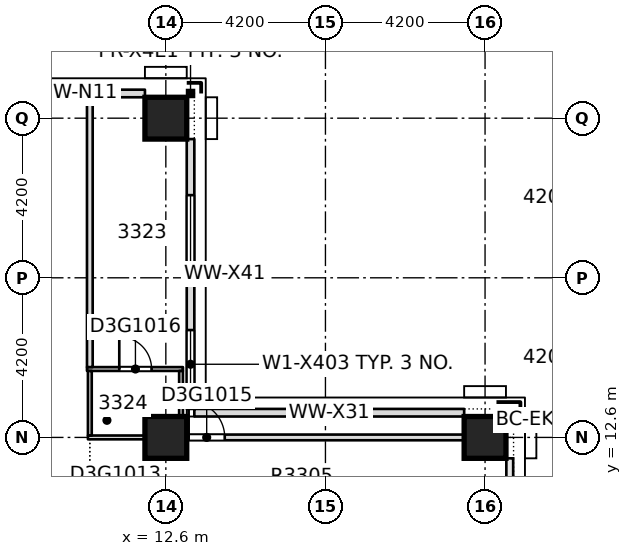
"""IFC4 building model, lengths in metres.
Left out: names, types, materials, properties, quantities, classifications, styles, units other than length and angle.
Written with IfcOpenShell. Run it as: python <this file> out.ifc"""

import sys

from ifc_helpers import new_model, si_unit, direction, frame, frame_2d, origin, origin_2d, place, context, subcontext, project, spatial, rectangle, extrude, element, fill, save


model = new_model("IFC4")
c1 = context("Model", 3, precision=1e-05, world=origin(), true_north=direction((0.0, 1.0)))
c2 = subcontext(c1, "Body", "Model", "MODEL_VIEW")
j1 = project(units=[si_unit("LENGTHUNIT", "METRE"), si_unit("PLANEANGLEUNIT", "RADIAN")], contexts=[c1])
p1 = place(None, origin())
s1 = spatial("IfcSite", under=j1, at=p1, CompositionType="ELEMENT")
p2 = place(p1, origin())
s2 = spatial("IfcBuilding", under=s1, at=p2, CompositionType="ELEMENT")
p3 = place(p2, frame((0.0, 0.0, 133.1)))
s3 = spatial("IfcBuildingStorey", under=s2, at=p3, CompositionType="ELEMENT", Elevation=133.1)
for number, where, z_axis, x_axis in (
    (1, (12.6, 12.6, -0.4), (0.0, 0.0, 1.0), (1.0, 0.0, 0.0)),
    (2, (21.0, 12.6, -0.4), (0.0, 0.0, 1.0), (1.0, 0.0, 0.0)),
    (3, (12.6, 21.0, -0.4), (0.0, 0.0, 1.0), (1.0, 0.0, 0.0)),
):
    element("IfcColumn", number, at=place(p3, frame(where, z_axis=z_axis, x_axis=x_axis)), inside=s3, PredefinedType="COLUMN", context=c2, shape_type="SweptSolid", body=[
        extrude(rectangle(XDim=1.1, YDim=1.1, at=origin_2d()), origin(), (0.0, 0.0, 1.0), 3.45),
    ])
p4 = place(p3, frame((10.55, 12.6, 0.0), z_axis=(0.0, 0.0, 1.0), x_axis=(1.0, 0.0, 0.0)))
e4 = element("IfcWall", 4, at=p4, inside=s3, PredefinedType="PARTITIONING", context=c2, shape_type="SweptSolid", body=[
    extrude(rectangle(XDim=2.5, YDim=0.1, at=frame_2d((1.25, 0.0))), origin(), (0.0, 0.0, 1.0), 3.05),
])
p5 = place(p3, frame((12.95, 12.6, 0.0), z_axis=(0.0, 0.0, 1.0), x_axis=(1.0, 0.0, 0.0)))
e5 = element("IfcWall", 5, at=p5, inside=s3, PredefinedType="PARTITIONING", context=c2, shape_type="SweptSolid", body=[
    extrude(rectangle(XDim=0.2, YDim=0.15, at=frame_2d((0.1, 0.0))), origin(), (0.0, 0.0, 1.0), 3.05),
])
p6 = place(p3, frame((10.525, 14.4, 0.0), z_axis=(0.0, 0.0, 1.0), x_axis=(1.0, 0.0, 0.0)))
e6 = element("IfcWall", 6, at=p6, inside=s3, PredefinedType="PARTITIONING", context=c2, shape_type="SweptSolid", body=[
    extrude(rectangle(XDim=2.525, YDim=0.1, at=frame_2d((1.263, 0.0))), origin(), (0.0, 0.0, 1.0), 3.05),
])
p7 = place(p6, frame((0.85, 0.0, 0.0)))
e7 = element("IfcOpeningElement", 7, at=p7, cuts=e6, PredefinedType="OPENING", context=c2, shape_type="SweptSolid", body=[
    extrude(rectangle(XDim=0.85, YDim=2.1, at=frame_2d((0.425, 1.05))), frame((0.0, 0.06, 0.0), z_axis=(0.0, -1.0, 0.0), x_axis=(1.0, 0.0, 0.0)), (0.0, 0.0, 1.0), 0.12),
])
p8 = place(p3, frame((10.6, 12.65, 0.0), z_axis=(0.0, 0.0, 1.0), x_axis=(0.0, 1.0, 0.0)))
e8 = element("IfcWall", 8, at=p8, inside=s3, PredefinedType="PARTITIONING", context=c2, shape_type="SweptSolid", body=[
    extrude(rectangle(XDim=1.7, YDim=0.1, at=frame_2d((0.85, 0.0))), origin(), (0.0, 0.0, 1.0), 3.05),
])
p9 = place(p3, frame((10.6, 14.45, 0.0), z_axis=(0.0, 0.0, 1.0), x_axis=(0.0, 1.0, 0.0)))
e9 = element("IfcWall", 9, at=p9, inside=s3, PredefinedType="PARTITIONING", context=c2, shape_type="SweptSolid", body=[
    extrude(rectangle(XDim=7.1, YDim=0.15, at=frame_2d((3.55, 0.0))), origin(), (0.0, 0.0, 1.0), 3.05),
])
p10 = place(p3, frame((13.0, 12.675, 0.0), z_axis=(0.0, 0.0, 1.0), x_axis=(0.0, 1.0, 0.0)))
e10 = element("IfcWall", 10, at=p10, inside=s3, PredefinedType="PARTITIONING", context=c2, shape_type="SweptSolid", body=[
    extrude(rectangle(XDim=1.675, YDim=0.1, at=frame_2d((0.837, 0.0))), origin(), (0.0, 0.0, 1.0), 3.05),
])
p11 = place(p3, frame((20.45, 13.25, 0.0), z_axis=(0.0, 0.0, 1.0), x_axis=(-1.0, 0.0, 0.0)))
e11 = element("IfcWall", 11, at=p11, inside=s3, PredefinedType="STANDARD", context=c2, shape_type="SweptSolid", body=[
    extrude(rectangle(XDim=7.1, YDim=0.2, at=frame_2d((3.55, 0.0))), origin(), (0.0, 0.0, 1.0), 3.05),
])
p12 = place(p3, frame((13.25, 13.35, 0.0), z_axis=(0.0, 0.0, 1.0), x_axis=(0.0, 1.0, 0.0)))
e12 = element("IfcWall", 12, at=p12, inside=s3, PredefinedType="STANDARD", context=c2, shape_type="SweptSolid", body=[
    extrude(rectangle(XDim=7.1, YDim=0.2, at=frame_2d((3.55, 0.0))), origin(), (0.0, 0.0, 1.0), 3.05),
])
p13 = place(p12, frame((0.275, 0.0, 0.2)))
e13 = element("IfcOpeningElement", 13, at=p13, cuts=e12, PredefinedType="OPENING", context=c2, shape_type="SweptSolid", body=[
    extrude(rectangle(XDim=1.8, YDim=2.65, at=frame_2d((0.9, 1.325))), frame((0.0, 0.11, 0.0), z_axis=(0.0, -1.0, 0.0), x_axis=(1.0, 0.0, 0.0)), (0.0, 0.0, 1.0), 0.22),
])
p14 = place(p12, frame((3.825, 0.0, 0.2)))
e14 = element("IfcOpeningElement", 14, at=p14, cuts=e12, PredefinedType="OPENING", context=c2, shape_type="SweptSolid", body=[
    extrude(rectangle(XDim=1.8, YDim=2.65, at=frame_2d((0.9, 1.325))), frame((0.0, 0.11, 0.0), z_axis=(0.0, -1.0, 0.0), x_axis=(1.0, 0.0, 0.0)), (0.0, 0.0, 1.0), 0.22),
])
p15 = place(p3, frame((12.05, 21.65, 0.0), z_axis=(0.0, 0.0, 1.0), x_axis=(-1.0, 0.0, 0.0)))
e15 = element("IfcWall", 15, at=p15, inside=s3, PredefinedType="STANDARD", context=c2, shape_type="SweptSolid", body=[
    extrude(rectangle(XDim=3.65, YDim=0.2, at=frame_2d((1.825, 0.0))), origin(), (0.0, 0.0, 1.0), 3.05),
])
p16 = place(p15, frame((1.67, 0.0, 0.2)))
e16 = element("IfcOpeningElement", 16, at=p16, cuts=e15, PredefinedType="OPENING", context=c2, shape_type="SweptSolid", body=[
    extrude(rectangle(XDim=1.8, YDim=2.65, at=frame_2d((0.9, 1.325))), frame((0.0, 0.11, 0.0), z_axis=(0.0, -1.0, 0.0), x_axis=(1.0, 0.0, 0.0)), (0.0, 0.0, 1.0), 0.22),
])
p17 = place(p3, frame((13.15, 12.6, 0.0), z_axis=(0.0, 0.0, 1.0), x_axis=(1.0, 0.0, 0.0)))
e17 = element("IfcWall", 17, at=p17, inside=s3, PredefinedType="PARTITIONING", context=c2, shape_type="SweptSolid", body=[
    extrude(rectangle(XDim=7.3, YDim=0.15, at=frame_2d((3.65, 0.0))), origin(), (0.0, 0.0, 1.0), 2.5),
])
p18 = place(p17, frame((0.05, 0.0, 0.0)))
e18 = element("IfcOpeningElement", 18, at=p18, cuts=e17, PredefinedType="OPENING", context=c2, shape_type="SweptSolid", body=[
    extrude(rectangle(XDim=0.95, YDim=2.1, at=frame_2d((0.475, 1.05))), frame((0.0, 0.085, 0.0), z_axis=(0.0, -1.0, 0.0), x_axis=(1.0, 0.0, 0.0)), (0.0, 0.0, 1.0), 0.17),
])
p19 = place(p3, frame((20.45, 12.6, 0.0), z_axis=(0.0, 0.0, 1.0), x_axis=(1.0, 0.0, 0.0)))
e19 = element("IfcWall", 19, at=p19, inside=s3, PredefinedType="PARTITIONING", context=c2, shape_type="SweptSolid", body=[
    extrude(rectangle(XDim=1.1, YDim=0.15, at=frame_2d((0.55, 0.0))), origin(), (0.0, 0.0, 1.0), 3.05),
])
p20 = place(p18, origin())
e20 = element("IfcDoor", 20, at=p20, inside=s3, OperationType="SINGLE_SWING_LEFT", PredefinedType="DOOR", context=c2, shape_type="SweptSolid", body=[
    extrude(rectangle(XDim=0.95, YDim=2.1, at=frame_2d((0.475, 1.05))), frame((0.0, 0.025, 0.0), z_axis=(0.0, -1.0, 0.0), x_axis=(1.0, 0.0, 0.0)), (0.0, 0.0, 1.0), 0.05),
])
fill(e18, e20)
p21 = place(p7, origin())
e21 = element("IfcDoor", 21, at=p21, inside=s3, OperationType="SINGLE_SWING_RIGHT", PredefinedType="DOOR", context=c2, shape_type="SweptSolid", body=[
    extrude(rectangle(XDim=0.85, YDim=2.1, at=frame_2d((0.425, 1.05))), frame((0.0, 0.025, 0.0), z_axis=(0.0, -1.0, 0.0), x_axis=(1.0, 0.0, 0.0)), (0.0, 0.0, 1.0), 0.05),
])
fill(e7, e21)
p22 = place(p13, origin())
e22 = element("IfcWindow", 22, at=p22, inside=s3, PartitioningType="SINGLE_PANEL", PredefinedType="WINDOW", context=c2, shape_type="SweptSolid", body=[
    extrude(rectangle(XDim=1.8, YDim=2.65, at=frame_2d((0.9, 1.325))), frame((0.0, 0.03, 0.0), z_axis=(0.0, -1.0, 0.0), x_axis=(1.0, 0.0, 0.0)), (0.0, 0.0, 1.0), 0.06),
])
fill(e13, e22)
p23 = place(p14, origin())
e23 = element("IfcWindow", 23, at=p23, inside=s3, PartitioningType="SINGLE_PANEL", PredefinedType="WINDOW", context=c2, shape_type="SweptSolid", body=[
    extrude(rectangle(XDim=1.8, YDim=2.65, at=frame_2d((0.9, 1.325))), frame((0.0, 0.03, 0.0), z_axis=(0.0, -1.0, 0.0), x_axis=(1.0, 0.0, 0.0)), (0.0, 0.0, 1.0), 0.06),
])
fill(e14, e23)
p24 = place(p16, origin())
e24 = element("IfcWindow", 24, at=p24, inside=s3, PartitioningType="SINGLE_PANEL", PredefinedType="WINDOW", context=c2, shape_type="SweptSolid", body=[
    extrude(rectangle(XDim=1.8, YDim=2.65, at=frame_2d((0.9, 1.325))), frame((0.0, 0.03, 0.0), z_axis=(0.0, -1.0, 0.0), x_axis=(1.0, 0.0, 0.0)), (0.0, 0.0, 1.0), 0.06),
])
fill(e16, e24)
save(model, sys.argv[1])
